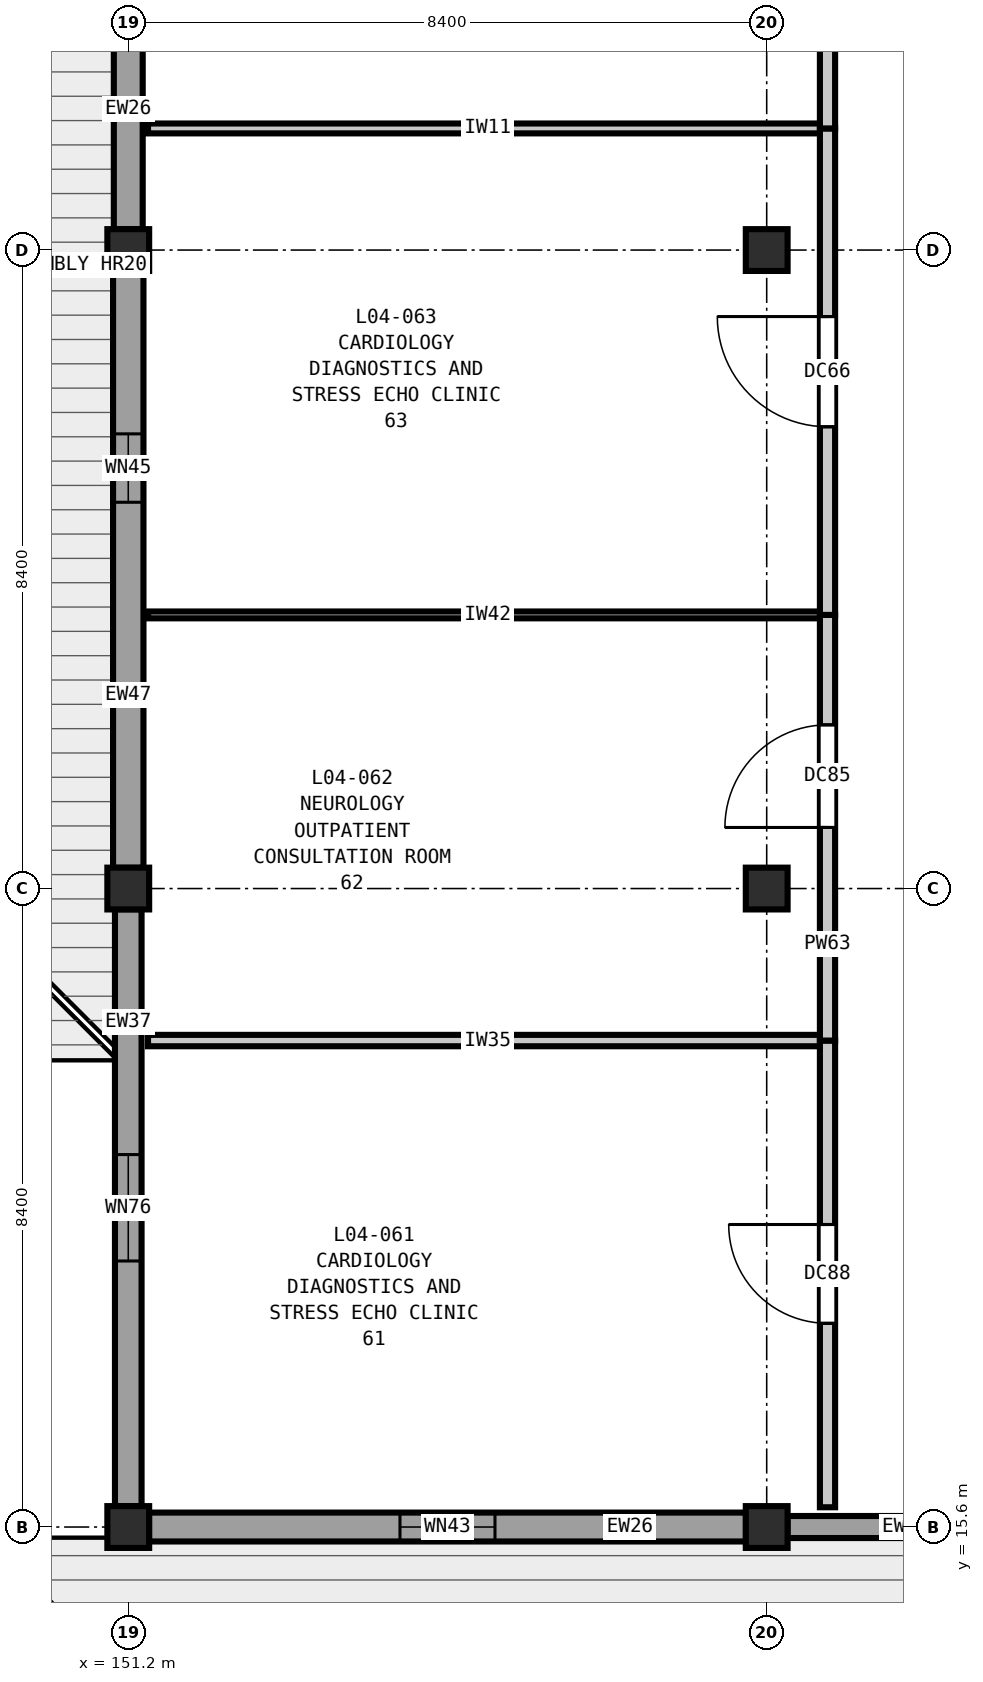
"""IFC4 building model, lengths in metres.
Left out: names, types, materials, properties, quantities, classifications, styles, units other than length and angle.
Written with IfcOpenShell. Run it as: python <this file> out.ifc"""

import sys

from ifc_helpers import new_model, si_unit, direction, frame, frame_2d, origin, origin_2d, place, context, subcontext, project, spatial, rectangle, extrude, element, fill, save


model = new_model("IFC4")
c1 = context("Model", 3, precision=1e-05, world=origin(), true_north=direction((0.0, 1.0)))
c2 = subcontext(c1, "Body", "Model", "MODEL_VIEW")
j1 = project(units=[si_unit("LENGTHUNIT", "METRE"), si_unit("PLANEANGLEUNIT", "RADIAN")], contexts=[c1])
p1 = place(None, origin())
s1 = spatial("IfcSite", under=j1, at=p1, CompositionType="ELEMENT")
p2 = place(p1, origin())
s2 = spatial("IfcBuilding", under=s1, at=p2, CompositionType="ELEMENT")
p3 = place(p2, frame((0.0, 0.0, 20.4)))
s3 = spatial("IfcBuildingStorey", under=s2, at=p3, CompositionType="ELEMENT", Elevation=20.4)
for number, where, z_axis, x_axis in (
    (1, (151.2, 15.6, 0.0), (0.0, 0.0, 1.0), (1.0, 0.0, 0.0)),
    (2, (151.2, 24.0, 0.0), (0.0, 0.0, 1.0), (1.0, 0.0, 0.0)),
    (3, (151.2, 32.4, 0.0), (0.0, 0.0, 1.0), (1.0, 0.0, 0.0)),
    (4, (159.6, 15.6, 0.0), (0.0, 0.0, 1.0), (1.0, 0.0, 0.0)),
    (5, (159.6, 24.0, 0.0), (0.0, 0.0, 1.0), (1.0, 0.0, 0.0)),
    (6, (159.6, 32.4, 0.0), (0.0, 0.0, 1.0), (1.0, 0.0, 0.0)),
):
    element("IfcColumn", number, at=place(p3, frame(where, z_axis=z_axis, x_axis=x_axis)), inside=s3, PredefinedType="COLUMN", context=c2, shape_type="SweptSolid", body=[
        extrude(rectangle(XDim=0.55, YDim=0.55, at=origin_2d()), origin(), (0.0, 0.0, 1.0), 4.2),
    ])
p4 = place(p3, frame((167.727, 15.6, 0.0), z_axis=(0.0, 0.0, 1.0), x_axis=(-1.0, 0.0, 0.0)))
e7 = element("IfcWall", 7, at=p4, inside=s3, PredefinedType="SOLIDWALL", context=c2, shape_type="SweptSolid", body=[
    extrude(rectangle(XDim=7.854, YDim=0.29, at=frame_2d((3.927, 0.0))), origin(), (0.0, 0.0, 1.0), 3.48),
])
p5 = place(p4, frame((3.352, 0.0, 0.9)))
e8 = element("IfcOpeningElement", 8, at=p5, cuts=e7, PredefinedType="OPENING", context=c2, shape_type="SweptSolid", body=[
    extrude(rectangle(XDim=1.15, YDim=1.4, at=frame_2d((0.575, 0.7))), frame((0.0, 0.155, 0.0), z_axis=(0.0, -1.0, 0.0), x_axis=(1.0, 0.0, 0.0)), (0.0, 0.0, 1.0), 0.31),
])
p6 = place(p3, frame((159.327, 15.6, 0.0), z_axis=(0.0, 0.0, 1.0), x_axis=(-1.0, 0.0, 0.0)))
e9 = element("IfcWall", 9, at=p6, inside=s3, PredefinedType="SOLIDWALL", context=c2, shape_type="SweptSolid", body=[
    extrude(rectangle(XDim=7.854, YDim=0.38, at=frame_2d((3.927, 0.0))), origin(), (0.0, 0.0, 1.0), 3.48),
])
p7 = place(p6, frame((3.302, 0.0, 0.9)))
e10 = element("IfcOpeningElement", 10, at=p7, cuts=e9, PredefinedType="OPENING", context=c2, shape_type="SweptSolid", body=[
    extrude(rectangle(XDim=1.25, YDim=1.4, at=frame_2d((0.625, 0.7))), frame((0.0, 0.2, 0.0), z_axis=(0.0, -1.0, 0.0), x_axis=(1.0, 0.0, 0.0)), (0.0, 0.0, 1.0), 0.4),
])
p8 = place(p3, frame((151.2, 15.873, 0.0), z_axis=(0.0, 0.0, 1.0), x_axis=(0.0, 1.0, 0.0)))
e11 = element("IfcWall", 11, at=p8, inside=s3, PredefinedType="SOLIDWALL", context=c2, shape_type="SweptSolid", body=[
    extrude(rectangle(XDim=7.854, YDim=0.35, at=frame_2d((3.927, 0.0))), origin(), (0.0, 0.0, 1.0), 3.48),
])
p9 = place(p8, frame((3.227, 0.0, 0.9)))
e12 = element("IfcOpeningElement", 12, at=p9, cuts=e11, PredefinedType="OPENING", context=c2, shape_type="SweptSolid", body=[
    extrude(rectangle(XDim=1.4, YDim=1.4, at=frame_2d((0.7, 0.7))), frame((0.0, 0.185, 0.0), z_axis=(0.0, -1.0, 0.0), x_axis=(1.0, 0.0, 0.0)), (0.0, 0.0, 1.0), 0.37),
])
p10 = place(p3, frame((151.2, 24.273, 0.0), z_axis=(0.0, 0.0, 1.0), x_axis=(0.0, 1.0, 0.0)))
e13 = element("IfcWall", 13, at=p10, inside=s3, PredefinedType="SOLIDWALL", context=c2, shape_type="SweptSolid", body=[
    extrude(rectangle(XDim=7.854, YDim=0.4, at=frame_2d((3.927, 0.0))), origin(), (0.0, 0.0, 1.0), 3.48),
])
p11 = place(p10, frame((4.809, 0.0, 0.9)))
e14 = element("IfcOpeningElement", 14, at=p11, cuts=e13, PredefinedType="OPENING", context=c2, shape_type="SweptSolid", body=[
    extrude(rectangle(XDim=0.9, YDim=1.55, at=frame_2d((0.45, 0.775))), frame((0.0, 0.21, 0.0), z_axis=(0.0, -1.0, 0.0), x_axis=(1.0, 0.0, 0.0)), (0.0, 0.0, 1.0), 0.42),
])
p12 = place(p3, frame((151.2, 32.673, 0.0), z_axis=(0.0, 0.0, 1.0), x_axis=(0.0, 1.0, 0.0)))
e15 = element("IfcWall", 15, at=p12, inside=s3, PredefinedType="SOLIDWALL", context=c2, shape_type="SweptSolid", body=[
    extrude(rectangle(XDim=7.854, YDim=0.38, at=frame_2d((3.927, 0.0))), origin(), (0.0, 0.0, 1.0), 3.48),
])
p13 = place(p12, frame((3.427, 0.0, 0.9)))
e16 = element("IfcOpeningElement", 16, at=p13, cuts=e15, PredefinedType="OPENING", context=c2, shape_type="SweptSolid", body=[
    extrude(rectangle(XDim=1.0, YDim=1.55, at=frame_2d((0.5, 0.775))), frame((0.0, 0.2, 0.0), z_axis=(0.0, -1.0, 0.0), x_axis=(1.0, 0.0, 0.0)), (0.0, 0.0, 1.0), 0.4),
])
p14 = place(p3, frame((151.46, 22.0, 0.0), z_axis=(0.0, 0.0, 1.0), x_axis=(1.0, 0.0, 0.0)))
e17 = element("IfcWall", 17, at=p14, inside=s3, PredefinedType="PARTITIONING", context=c2, shape_type="SweptSolid", body=[
    extrude(rectangle(XDim=8.94, YDim=0.15, at=frame_2d((4.47, 0.0))), origin(), (0.0, 0.0, 1.0), 3.82),
])
p15 = place(p3, frame((151.46, 27.6, 0.0), z_axis=(0.0, 0.0, 1.0), x_axis=(1.0, 0.0, 0.0)))
e18 = element("IfcWall", 18, at=p15, inside=s3, PredefinedType="PARTITIONING", context=c2, shape_type="SweptSolid", body=[
    extrude(rectangle(XDim=8.94, YDim=0.09, at=frame_2d((4.47, 0.0))), origin(), (0.0, 0.0, 1.0), 3.82),
])
p16 = place(p3, frame((151.46, 34.0, 0.0), z_axis=(0.0, 0.0, 1.0), x_axis=(1.0, 0.0, 0.0)))
e19 = element("IfcWall", 19, at=p16, inside=s3, PredefinedType="PARTITIONING", context=c2, shape_type="SweptSolid", body=[
    extrude(rectangle(XDim=8.94, YDim=0.13, at=frame_2d((4.47, 0.0))), origin(), (0.0, 0.0, 1.0), 3.82),
])
p17 = place(p3, frame((160.4, 15.86, 0.0), z_axis=(0.0, 0.0, 1.0), x_axis=(0.0, 1.0, 0.0)))
e20 = element("IfcWall", 20, at=p17, inside=s3, PredefinedType="PARTITIONING", context=c2, shape_type="SweptSolid", body=[
    extrude(rectangle(XDim=6.14, YDim=0.2, at=frame_2d((3.07, 0.0))), origin(), (0.0, 0.0, 1.0), 3.82),
])
p18 = place(p17, frame((2.42, 0.0, 0.0)))
e21 = element("IfcOpeningElement", 21, at=p18, cuts=e20, PredefinedType="OPENING", context=c2, shape_type="SweptSolid", body=[
    extrude(rectangle(XDim=1.3, YDim=2.2, at=frame_2d((0.65, 1.1))), frame((0.0, 0.11, 0.0), z_axis=(0.0, -1.0, 0.0), x_axis=(1.0, 0.0, 0.0)), (0.0, 0.0, 1.0), 0.22),
])
p19 = place(p3, frame((160.4, 22.0, 0.0), z_axis=(0.0, 0.0, 1.0), x_axis=(0.0, 1.0, 0.0)))
e22 = element("IfcWall", 22, at=p19, inside=s3, PredefinedType="PARTITIONING", context=c2, shape_type="SweptSolid", body=[
    extrude(rectangle(XDim=5.6, YDim=0.2, at=frame_2d((2.8, 0.0))), origin(), (0.0, 0.0, 1.0), 3.82),
])
p20 = place(p19, frame((2.804, 0.0, 0.0)))
e23 = element("IfcOpeningElement", 23, at=p20, cuts=e22, PredefinedType="OPENING", context=c2, shape_type="SweptSolid", body=[
    extrude(rectangle(XDim=1.35, YDim=2.2, at=frame_2d((0.675, 1.1))), frame((0.0, 0.11, 0.0), z_axis=(0.0, -1.0, 0.0), x_axis=(1.0, 0.0, 0.0)), (0.0, 0.0, 1.0), 0.22),
])
p21 = place(p3, frame((160.4, 27.6, 0.0), z_axis=(0.0, 0.0, 1.0), x_axis=(0.0, 1.0, 0.0)))
e24 = element("IfcWall", 24, at=p21, inside=s3, PredefinedType="PARTITIONING", context=c2, shape_type="SweptSolid", body=[
    extrude(rectangle(XDim=6.4, YDim=0.2, at=frame_2d((3.2, 0.0))), origin(), (0.0, 0.0, 1.0), 3.82),
])
p22 = place(p21, frame((2.475, 0.0, 0.0)))
e25 = element("IfcOpeningElement", 25, at=p22, cuts=e24, PredefinedType="OPENING", context=c2, shape_type="SweptSolid", body=[
    extrude(rectangle(XDim=1.45, YDim=2.25, at=frame_2d((0.725, 1.125))), frame((0.0, 0.11, 0.0), z_axis=(0.0, -1.0, 0.0), x_axis=(1.0, 0.0, 0.0)), (0.0, 0.0, 1.0), 0.22),
])
p23 = place(p3, frame((160.4, 34.0, 0.0), z_axis=(0.0, 0.0, 1.0), x_axis=(0.0, 1.0, 0.0)))
e26 = element("IfcWall", 26, at=p23, inside=s3, PredefinedType="PARTITIONING", context=c2, shape_type="SweptSolid", body=[
    extrude(rectangle(XDim=5.6, YDim=0.2, at=frame_2d((2.8, 0.0))), origin(), (0.0, 0.0, 1.0), 3.82),
])
p24 = place(p23, frame((2.025, 0.0, 0.0)))
e27 = element("IfcOpeningElement", 27, at=p24, cuts=e26, PredefinedType="OPENING", context=c2, shape_type="SweptSolid", body=[
    extrude(rectangle(XDim=1.55, YDim=2.25, at=frame_2d((0.775, 1.125))), frame((0.0, 0.11, 0.0), z_axis=(0.0, -1.0, 0.0), x_axis=(1.0, 0.0, 0.0)), (0.0, 0.0, 1.0), 0.22),
])
p25 = place(p7, origin())
e28 = element("IfcWindow", 28, at=p25, inside=s3, PartitioningType="SINGLE_PANEL", PredefinedType="WINDOW", context=c2, shape_type="SweptSolid", body=[
    extrude(rectangle(XDim=1.25, YDim=1.4, at=frame_2d((0.625, 0.7))), frame((0.0, 0.03, 0.0), z_axis=(0.0, -1.0, 0.0), x_axis=(1.0, 0.0, 0.0)), (0.0, 0.0, 1.0), 0.06),
])
fill(e10, e28)
p26 = place(p9, origin())
e29 = element("IfcWindow", 29, at=p26, inside=s3, PartitioningType="SINGLE_PANEL", PredefinedType="WINDOW", context=c2, shape_type="SweptSolid", body=[
    extrude(rectangle(XDim=1.4, YDim=1.4, at=frame_2d((0.7, 0.7))), frame((0.0, 0.03, 0.0), z_axis=(0.0, -1.0, 0.0), x_axis=(1.0, 0.0, 0.0)), (0.0, 0.0, 1.0), 0.06),
])
fill(e12, e29)
p27 = place(p11, origin())
e30 = element("IfcWindow", 30, at=p27, inside=s3, PartitioningType="SINGLE_PANEL", PredefinedType="WINDOW", context=c2, shape_type="SweptSolid", body=[
    extrude(rectangle(XDim=0.9, YDim=1.55, at=frame_2d((0.45, 0.775))), frame((0.0, 0.03, 0.0), z_axis=(0.0, -1.0, 0.0), x_axis=(1.0, 0.0, 0.0)), (0.0, 0.0, 1.0), 0.06),
])
fill(e14, e30)
p28 = place(p18, origin())
e31 = element("IfcDoor", 31, at=p28, inside=s3, OperationType="SINGLE_SWING_RIGHT", PredefinedType="DOOR", context=c2, shape_type="SweptSolid", body=[
    extrude(rectangle(XDim=1.3, YDim=2.2, at=frame_2d((0.65, 1.1))), frame((0.0, 0.025, 0.0), z_axis=(0.0, -1.0, 0.0), x_axis=(1.0, 0.0, 0.0)), (0.0, 0.0, 1.0), 0.05),
])
fill(e21, e31)
p29 = place(p20, origin())
e32 = element("IfcDoor", 32, at=p29, inside=s3, OperationType="SINGLE_SWING_LEFT", PredefinedType="DOOR", context=c2, shape_type="SweptSolid", body=[
    extrude(rectangle(XDim=1.35, YDim=2.2, at=frame_2d((0.675, 1.1))), frame((0.0, 0.025, 0.0), z_axis=(0.0, -1.0, 0.0), x_axis=(1.0, 0.0, 0.0)), (0.0, 0.0, 1.0), 0.05),
])
fill(e23, e32)
p30 = place(p22, origin())
e33 = element("IfcDoor", 33, at=p30, inside=s3, OperationType="SINGLE_SWING_RIGHT", PredefinedType="DOOR", context=c2, shape_type="SweptSolid", body=[
    extrude(rectangle(XDim=1.45, YDim=2.25, at=frame_2d((0.725, 1.125))), frame((0.0, 0.025, 0.0), z_axis=(0.0, -1.0, 0.0), x_axis=(1.0, 0.0, 0.0)), (0.0, 0.0, 1.0), 0.05),
])
fill(e25, e33)
save(model, sys.argv[1])
